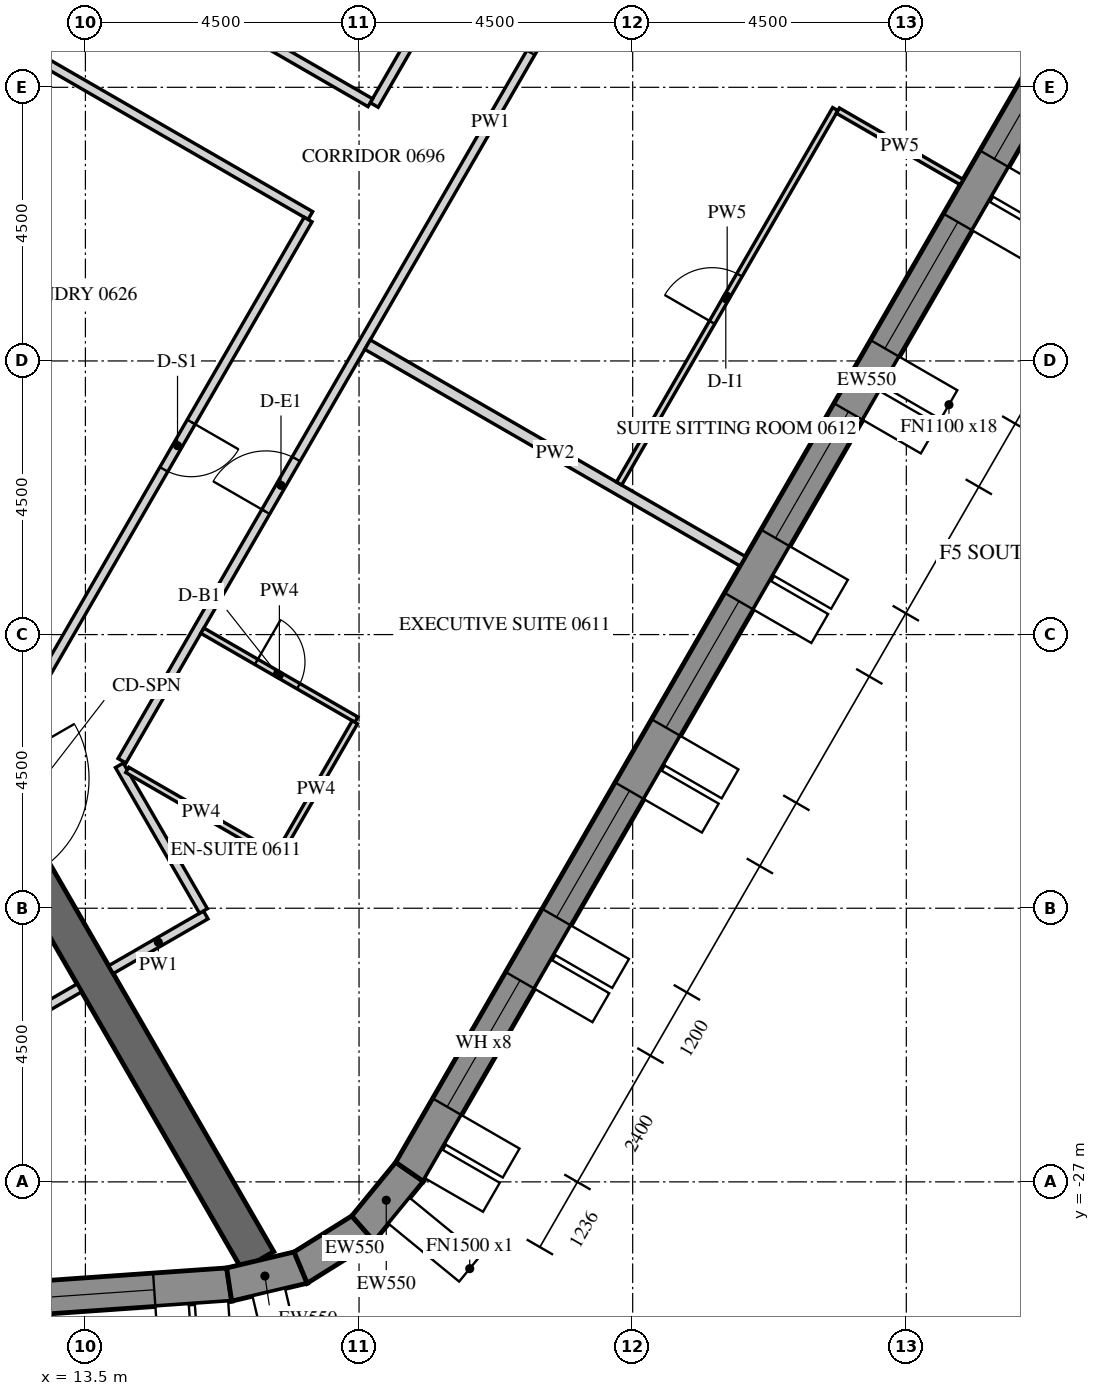
"""IFC4 building model, lengths in metres.
Left out: names, types, materials, properties, quantities, classifications, styles, units other than length and angle.
Written with IfcOpenShell. Run it as: python <this file> out.ifc"""

import sys

from ifc_helpers import new_model, si_unit, direction, frame, frame_2d, origin, place, context, subcontext, project, spatial, polyline, rectangle, outline, extrude, element, fill, save


model = new_model("IFC4")
c1 = context("Model", 3, precision=1e-05, world=origin(), true_north=direction((0.0, 1.0)))
c2 = subcontext(c1, "Body", "Model", "MODEL_VIEW")
j1 = project(units=[si_unit("LENGTHUNIT", "METRE"), si_unit("PLANEANGLEUNIT", "RADIAN")], contexts=[c1])
p1 = place(None, origin())
s1 = spatial("IfcSite", under=j1, at=p1, CompositionType="ELEMENT")
p2 = place(p1, origin())
s2 = spatial("IfcBuilding", under=s1, at=p2, CompositionType="ELEMENT")
p3 = place(p2, frame((0.0, 0.0, 92.1)))
s3 = spatial("IfcBuildingStorey", under=s2, at=p3, CompositionType="ELEMENT", Elevation=92.1)
p4 = place(p3, frame((-14.134, -30.786, -0.15), z_axis=(0.0, 0.0, 1.0), x_axis=(0.997564037441, 0.069756657061, 0.0)))
e1 = element("IfcWall", 1, at=p4, inside=s3, PredefinedType="SOLIDWALL", context=c2, shape_type="SweptSolid", body=[
    extrude(outline(polyline([(-0.026, -0.275), (30.094, -0.275), (30.049, 0.275), (0.026, 0.275), (-0.026, -0.275)])), origin(), (0.0, 0.0, 1.0), 3.9),
])
p5 = place(p4, frame((1.236, 0.0, 1.05)))
e2 = element("IfcOpeningElement", 2, at=p5, cuts=e1, PredefinedType="OPENING", context=c2, shape_type="SweptSolid", body=[
    extrude(rectangle(XDim=2.4, YDim=2.4, at=frame_2d((1.2, 1.2))), frame((0.0, 0.285, 0.0), z_axis=(0.0, -1.0, 0.0), x_axis=(1.0, 0.0, 0.0)), (0.0, 0.0, 1.0), 0.57),
])
p6 = place(p4, frame((4.835, 0.0, 1.05)))
e3 = element("IfcOpeningElement", 3, at=p6, cuts=e1, PredefinedType="OPENING", context=c2, shape_type="SweptSolid", body=[
    extrude(rectangle(XDim=2.4, YDim=2.4, at=frame_2d((1.2, 1.2))), frame((0.0, 0.285, 0.0), z_axis=(0.0, -1.0, 0.0), x_axis=(1.0, 0.0, 0.0)), (0.0, 0.0, 1.0), 0.57),
])
p7 = place(p4, frame((8.436, 0.0, 1.05)))
e4 = element("IfcOpeningElement", 4, at=p7, cuts=e1, PredefinedType="OPENING", context=c2, shape_type="SweptSolid", body=[
    extrude(rectangle(XDim=2.4, YDim=2.4, at=frame_2d((1.2, 1.2))), frame((0.0, 0.285, 0.0), z_axis=(0.0, -1.0, 0.0), x_axis=(1.0, 0.0, 0.0)), (0.0, 0.0, 1.0), 0.57),
])
p8 = place(p4, frame((12.035, 0.0, 1.05)))
e5 = element("IfcOpeningElement", 5, at=p8, cuts=e1, PredefinedType="OPENING", context=c2, shape_type="SweptSolid", body=[
    extrude(rectangle(XDim=2.4, YDim=2.4, at=frame_2d((1.2, 1.2))), frame((0.0, 0.285, 0.0), z_axis=(0.0, -1.0, 0.0), x_axis=(1.0, 0.0, 0.0)), (0.0, 0.0, 1.0), 0.57),
])
p9 = place(p4, frame((15.635, 0.0, 1.05)))
e6 = element("IfcOpeningElement", 6, at=p9, cuts=e1, PredefinedType="OPENING", context=c2, shape_type="SweptSolid", body=[
    extrude(rectangle(XDim=2.4, YDim=2.4, at=frame_2d((1.2, 1.2))), frame((0.0, 0.285, 0.0), z_axis=(0.0, -1.0, 0.0), x_axis=(1.0, 0.0, 0.0)), (0.0, 0.0, 1.0), 0.57),
])
p10 = place(p4, frame((19.236, 0.0, 1.05)))
e7 = element("IfcOpeningElement", 7, at=p10, cuts=e1, PredefinedType="OPENING", context=c2, shape_type="SweptSolid", body=[
    extrude(rectangle(XDim=2.4, YDim=2.4, at=frame_2d((1.2, 1.2))), frame((0.0, 0.285, 0.0), z_axis=(0.0, -1.0, 0.0), x_axis=(1.0, 0.0, 0.0)), (0.0, 0.0, 1.0), 0.57),
])
p11 = place(p4, frame((22.835, 0.0, 1.05)))
e8 = element("IfcOpeningElement", 8, at=p11, cuts=e1, PredefinedType="OPENING", context=c2, shape_type="SweptSolid", body=[
    extrude(rectangle(XDim=2.4, YDim=2.4, at=frame_2d((1.2, 1.2))), frame((0.0, 0.285, 0.0), z_axis=(0.0, -1.0, 0.0), x_axis=(1.0, 0.0, 0.0)), (0.0, 0.0, 1.0), 0.57),
])
p12 = place(p4, frame((26.436, 0.0, 1.05)))
e9 = element("IfcOpeningElement", 9, at=p12, cuts=e1, PredefinedType="OPENING", context=c2, shape_type="SweptSolid", body=[
    extrude(rectangle(XDim=2.4, YDim=2.4, at=frame_2d((1.2, 1.2))), frame((0.0, 0.285, 0.0), z_axis=(0.0, -1.0, 0.0), x_axis=(1.0, 0.0, 0.0)), (0.0, 0.0, 1.0), 0.57),
])
p13 = place(p3, frame((15.864, -28.688, -0.15), z_axis=(0.0, 0.0, 1.0), x_axis=(0.973063591128, 0.230536868247, 0.0)))
e10 = element("IfcWall", 10, at=p13, inside=s3, PredefinedType="SOLIDWALL", context=c2, shape_type="SweptSolid", body=[
    extrude(outline(polyline([(-0.022, -0.275), (1.253, -0.275), (1.163, 0.275), (0.022, 0.275), (-0.022, -0.275)])), origin(), (0.0, 0.0, 1.0), 3.9),
])
p14 = place(p3, frame((17.04, -28.41, -0.15), z_axis=(0.0, 0.0, 1.0), x_axis=(0.847952888306, 0.530071598195, 0.0)))
e11 = element("IfcWall", 11, at=p14, inside=s3, PredefinedType="SOLIDWALL", context=c2, shape_type="SweptSolid", body=[
    extrude(outline(polyline([(-0.045, -0.275), (1.253, -0.275), (1.163, 0.275), (0.045, 0.275), (-0.045, -0.275)])), origin(), (0.0, 0.0, 1.0), 3.9),
])
p15 = place(p3, frame((18.064, -27.769, -0.15), z_axis=(0.0, 0.0, 1.0), x_axis=(0.633842757806, 0.773461930787, 0.0)))
e12 = element("IfcWall", 12, at=p15, inside=s3, PredefinedType="SOLIDWALL", context=c2, shape_type="SweptSolid", body=[
    extrude(outline(polyline([(-0.045, -0.275), (1.231, -0.275), (1.186, 0.275), (0.045, 0.275), (-0.045, -0.275)])), origin(), (0.0, 0.0, 1.0), 3.9),
])
p16 = place(p3, frame((18.83, -26.835, -0.15), z_axis=(0.0, 0.0, 1.0), x_axis=(0.500003800416, 0.866023209602, 0.0)))
e13 = element("IfcWall", 13, at=p16, inside=s3, PredefinedType="SOLIDWALL", context=c2, shape_type="SweptSolid", body=[
    extrude(outline(polyline([(-0.022, -0.275), (30.097, -0.275), (30.045, 0.275), (0.022, 0.275), (-0.022, -0.275)])), origin(), (0.0, 0.0, 1.0), 3.9),
])
p17 = place(p16, frame((1.236, 0.0, 1.05)))
e14 = element("IfcOpeningElement", 14, at=p17, cuts=e13, PredefinedType="OPENING", context=c2, shape_type="SweptSolid", body=[
    extrude(rectangle(XDim=2.4, YDim=2.4, at=frame_2d((1.2, 1.2))), frame((0.0, 0.285, 0.0), z_axis=(0.0, -1.0, 0.0), x_axis=(1.0, 0.0, 0.0)), (0.0, 0.0, 1.0), 0.57),
])
p18 = place(p16, frame((4.835, 0.0, 1.05)))
e15 = element("IfcOpeningElement", 15, at=p18, cuts=e13, PredefinedType="OPENING", context=c2, shape_type="SweptSolid", body=[
    extrude(rectangle(XDim=2.4, YDim=2.4, at=frame_2d((1.2, 1.2))), frame((0.0, 0.285, 0.0), z_axis=(0.0, -1.0, 0.0), x_axis=(1.0, 0.0, 0.0)), (0.0, 0.0, 1.0), 0.57),
])
p19 = place(p16, frame((8.436, 0.0, 1.05)))
e16 = element("IfcOpeningElement", 16, at=p19, cuts=e13, PredefinedType="OPENING", context=c2, shape_type="SweptSolid", body=[
    extrude(rectangle(XDim=2.4, YDim=2.4, at=frame_2d((1.2, 1.2))), frame((0.0, 0.285, 0.0), z_axis=(0.0, -1.0, 0.0), x_axis=(1.0, 0.0, 0.0)), (0.0, 0.0, 1.0), 0.57),
])
p20 = place(p16, frame((12.035, 0.0, 1.05)))
e17 = element("IfcOpeningElement", 17, at=p20, cuts=e13, PredefinedType="OPENING", context=c2, shape_type="SweptSolid", body=[
    extrude(rectangle(XDim=2.4, YDim=2.4, at=frame_2d((1.2, 1.2))), frame((0.0, 0.285, 0.0), z_axis=(0.0, -1.0, 0.0), x_axis=(1.0, 0.0, 0.0)), (0.0, 0.0, 1.0), 0.57),
])
p21 = place(p16, frame((15.635, 0.0, 1.05)))
e18 = element("IfcOpeningElement", 18, at=p21, cuts=e13, PredefinedType="OPENING", context=c2, shape_type="SweptSolid", body=[
    extrude(rectangle(XDim=2.4, YDim=2.4, at=frame_2d((1.2, 1.2))), frame((0.0, 0.285, 0.0), z_axis=(0.0, -1.0, 0.0), x_axis=(1.0, 0.0, 0.0)), (0.0, 0.0, 1.0), 0.57),
])
p22 = place(p16, frame((19.236, 0.0, 1.05)))
e19 = element("IfcOpeningElement", 19, at=p22, cuts=e13, PredefinedType="OPENING", context=c2, shape_type="SweptSolid", body=[
    extrude(rectangle(XDim=2.4, YDim=2.4, at=frame_2d((1.2, 1.2))), frame((0.0, 0.285, 0.0), z_axis=(0.0, -1.0, 0.0), x_axis=(1.0, 0.0, 0.0)), (0.0, 0.0, 1.0), 0.57),
])
p23 = place(p16, frame((22.835, 0.0, 1.05)))
e20 = element("IfcOpeningElement", 20, at=p23, cuts=e13, PredefinedType="OPENING", context=c2, shape_type="SweptSolid", body=[
    extrude(rectangle(XDim=2.4, YDim=2.4, at=frame_2d((1.2, 1.2))), frame((0.0, 0.285, 0.0), z_axis=(0.0, -1.0, 0.0), x_axis=(1.0, 0.0, 0.0)), (0.0, 0.0, 1.0), 0.57),
])
p24 = place(p16, frame((26.436, 0.0, 1.05)))
e21 = element("IfcOpeningElement", 21, at=p24, cuts=e13, PredefinedType="OPENING", context=c2, shape_type="SweptSolid", body=[
    extrude(rectangle(XDim=2.4, YDim=2.4, at=frame_2d((1.2, 1.2))), frame((0.0, 0.285, 0.0), z_axis=(0.0, -1.0, 0.0), x_axis=(1.0, 0.0, 0.0)), (0.0, 0.0, 1.0), 0.57),
])
p25 = place(p3, frame((7.91, -13.7, -0.15), z_axis=(0.0, 0.0, 1.0), x_axis=(0.499999880136, 0.866025472988, 0.0)))
e22 = element("IfcWall", 22, at=p25, inside=s3, PredefinedType="SHEAR", context=c2, shape_type="SweptSolid", body=[
    extrude(outline(polyline([(-0.173, -0.3), (15.993, -0.3), (15.646, 0.3), (0.173, 0.3), (-0.173, -0.3)])), origin(), (0.0, 0.0, 1.0), 3.9),
])
p26 = place(p25, frame((7.039, 0.0, 0.15)))
e23 = element("IfcOpeningElement", 23, at=p26, cuts=e22, PredefinedType="OPENING", context=c2, shape_type="SweptSolid", body=[
    extrude(rectangle(XDim=1.8, YDim=2.4, at=frame_2d((0.9, 1.2))), frame((0.0, 0.31, 0.0), z_axis=(0.0, -1.0, 0.0), x_axis=(1.0, 0.0, 0.0)), (0.0, 0.0, 1.0), 0.62),
])
p27 = place(p3, frame((8.083, -14.0, -0.15), z_axis=(0.0, 0.0, 1.0), x_axis=(0.499997680643, -0.866026742862, 0.0)))
e24 = element("IfcWall", 24, at=p27, inside=s3, PredefinedType="SHEAR", context=c2, shape_type="SweptSolid", body=[
    extrude(rectangle(XDim=16.509, YDim=0.6, at=frame_2d((8.254, 0.0))), origin(), (0.0, 0.0, 1.0), 3.9),
])
p28 = place(p27, frame((7.354, 0.0, 0.15)))
e25 = element("IfcOpeningElement", 25, at=p28, cuts=e24, PredefinedType="OPENING", context=c2, shape_type="SweptSolid", body=[
    extrude(rectangle(XDim=1.8, YDim=2.4, at=frame_2d((0.9, 1.2))), frame((0.0, 0.31, 0.0), z_axis=(0.0, -1.0, 0.0), x_axis=(1.0, 0.0, 0.0)), (0.0, 0.0, 1.0), 0.62),
])
p29 = place(p3, frame((11.906, -24.673, 0.0), z_axis=(0.0, 0.0, 1.0), x_axis=(0.866013532718, 0.500020560727, 0.0)))
e26 = element("IfcWall", 26, at=p29, inside=s3, PredefinedType="PARTITIONING", context=c2, shape_type="SweptSolid", body=[
    extrude(rectangle(XDim=1.725, YDim=0.15, at=frame_2d((0.863, 0.0))), origin(), (0.0, 0.0, 1.0), 2.988),
])
p30 = place(p3, frame((13.92, -23.51, 0.0), z_axis=(0.0, 0.0, 1.0), x_axis=(0.866047807691, 0.499961193289, 0.0)))
e27 = element("IfcWall", 27, at=p30, inside=s3, PredefinedType="PARTITIONING", context=c2, shape_type="SweptSolid", body=[
    extrude(rectangle(XDim=1.8, YDim=0.15, at=frame_2d((0.9, 0.0))), origin(), (0.0, 0.0, 1.0), 2.988),
])
p31 = place(p3, frame((15.441, -22.545, 0.0), z_axis=(0.0, 0.0, 1.0), x_axis=(-0.499974611044, 0.866040061609, 0.0)))
e28 = element("IfcWall", 28, at=p31, inside=s3, PredefinedType="PARTITIONING", context=c2, shape_type="SweptSolid", body=[
    extrude(rectangle(XDim=2.766, YDim=0.15, at=frame_2d((1.383, 0.0))), origin(), (0.0, 0.0, 1.0), 2.988),
])
p32 = place(p3, frame((14.102, -20.075, 0.0), z_axis=(0.0, 0.0, 1.0), x_axis=(0.499996816197, 0.866027241946, 0.0)))
e29 = element("IfcWall", 29, at=p32, inside=s3, PredefinedType="PARTITIONING", context=c2, shape_type="SweptSolid", body=[
    extrude(rectangle(XDim=24.238, YDim=0.15, at=frame_2d((12.119, 0.0))), origin(), (0.0, 0.0, 1.0), 2.988),
])
p33 = place(p32, frame((4.729, 0.0, 0.0)))
e30 = element("IfcOpeningElement", 30, at=p33, cuts=e29, PredefinedType="OPENING", context=c2, shape_type="SweptSolid", body=[
    extrude(rectangle(XDim=1.0, YDim=2.1, at=frame_2d((0.5, 1.05))), frame((0.0, 0.085, 0.0), z_axis=(0.0, -1.0, 0.0), x_axis=(1.0, 0.0, 0.0)), (0.0, 0.0, 1.0), 0.17),
])
p34 = place(p32, frame((13.446, 0.0, 0.0)))
e31 = element("IfcOpeningElement", 31, at=p34, cuts=e29, PredefinedType="OPENING", context=c2, shape_type="SweptSolid", body=[
    extrude(rectangle(XDim=1.0, YDim=2.1, at=frame_2d((0.5, 1.05))), frame((0.0, 0.085, 0.0), z_axis=(0.0, -1.0, 0.0), x_axis=(1.0, 0.0, 0.0)), (0.0, 0.0, 1.0), 0.17),
])
p35 = place(p3, frame((24.058, 0.769, 0.0), z_axis=(0.0, 0.0, 1.0), x_axis=(-0.499995346943, -0.866028090212, 0.0)))
e32 = element("IfcWall", 32, at=p35, inside=s3, PredefinedType="PARTITIONING", context=c2, shape_type="SweptSolid", body=[
    extrude(rectangle(XDim=11.616, YDim=0.15, at=frame_2d((5.808, 0.0))), origin(), (0.0, 0.0, 1.0), 2.988),
])
p36 = place(p35, frame((5.358, 0.0, 0.0)))
e33 = element("IfcOpeningElement", 33, at=p36, cuts=e32, PredefinedType="OPENING", context=c2, shape_type="SweptSolid", body=[
    extrude(rectangle(XDim=0.9, YDim=2.1, at=frame_2d((0.45, 1.05))), frame((0.0, 0.085, 0.0), z_axis=(0.0, -1.0, 0.0), x_axis=(1.0, 0.0, 0.0)), (0.0, 0.0, 1.0), 0.17),
])
p37 = place(p3, frame((18.185, -9.253, 0.0), z_axis=(0.0, 0.0, 1.0), x_axis=(-0.866028703517, 0.499994284652, 0.0)))
e34 = element("IfcWall", 34, at=p37, inside=s3, PredefinedType="PARTITIONING", context=c2, shape_type="SweptSolid", body=[
    extrude(rectangle(XDim=6.375, YDim=0.15, at=frame_2d((3.188, 0.0))), origin(), (0.0, 0.0, 1.0), 2.988),
])
p38 = place(p3, frame((11.614, -7.884, 0.0), z_axis=(0.0, 0.0, 1.0), x_axis=(0.866021702275, -0.500006411147, 0.0)))
e35 = element("IfcWall", 35, at=p38, inside=s3, PredefinedType="PARTITIONING", context=c2, shape_type="SweptSolid", body=[
    extrude(rectangle(XDim=6.45, YDim=0.15, at=frame_2d((3.225, 0.0))), origin(), (0.0, 0.0, 1.0), 2.988),
])
p39 = place(p3, frame((17.162, -11.174, 0.0), z_axis=(0.0, 0.0, 1.0), x_axis=(-0.499997214665, -0.866027011893, 0.0)))
e36 = element("IfcWall", 36, at=p39, inside=s3, PredefinedType="PARTITIONING", context=c2, shape_type="SweptSolid", body=[
    extrude(rectangle(XDim=8.589, YDim=0.15, at=frame_2d((4.294, 0.0))), origin(), (0.0, 0.0, 1.0), 2.988),
])
p40 = place(p39, frame((3.844, 0.0, 0.0)))
e37 = element("IfcOpeningElement", 37, at=p40, cuts=e36, PredefinedType="OPENING", context=c2, shape_type="SweptSolid", body=[
    extrude(rectangle(XDim=0.9, YDim=2.1, at=frame_2d((0.45, 1.05))), frame((0.0, 0.085, 0.0), z_axis=(0.0, -1.0, 0.0), x_axis=(1.0, 0.0, 0.0)), (0.0, 0.0, 1.0), 0.17),
])
p41 = place(p3, frame((15.423, -17.936, 0.0), z_axis=(0.0, 0.0, 1.0), x_axis=(0.86601045545, -0.500025890382, 0.0)))
e38 = element("IfcWall", 38, at=p41, inside=s3, PredefinedType="PARTITIONING", context=c2, shape_type="SweptSolid", body=[
    extrude(rectangle(XDim=2.925, YDim=0.1, at=frame_2d((1.462, 0.0))), origin(), (0.0, 0.0, 1.0), 2.988),
])
p42 = place(p41, frame((1.025, 0.0, 0.0)))
e39 = element("IfcOpeningElement", 39, at=p42, cuts=e38, PredefinedType="OPENING", context=c2, shape_type="SweptSolid", body=[
    extrude(rectangle(XDim=0.8, YDim=2.1, at=frame_2d((0.4, 1.05))), frame((0.0, 0.06, 0.0), z_axis=(0.0, -1.0, 0.0), x_axis=(1.0, 0.0, 0.0)), (0.0, 0.0, 1.0), 0.12),
])
p43 = place(p3, frame((17.932, -19.442, 0.0), z_axis=(0.0, 0.0, 1.0), x_axis=(-0.500062241894, -0.865989465428, 0.0)))
e40 = element("IfcWall", 40, at=p43, inside=s3, PredefinedType="PARTITIONING", context=c2, shape_type="SweptSolid", body=[
    extrude(rectangle(XDim=2.55, YDim=0.1, at=frame_2d((1.275, 0.0))), origin(), (0.0, 0.0, 1.0), 2.988),
])
p44 = place(p3, frame((16.613, -21.625, 0.0), z_axis=(0.0, 0.0, 1.0), x_axis=(-0.866034573852, 0.49998411664, 0.0)))
e41 = element("IfcWall", 41, at=p44, inside=s3, PredefinedType="PARTITIONING", context=c2, shape_type="SweptSolid", body=[
    extrude(rectangle(XDim=2.8, YDim=0.1, at=frame_2d((1.4, 0.0))), origin(), (0.0, 0.0, 1.0), 2.988),
])
p45 = place(p3, frame((24.31, -16.794, 0.0), z_axis=(0.0, 0.0, 1.0), x_axis=(-0.866024672353, 0.500001266874, 0.0)))
e42 = element("IfcWall", 42, at=p45, inside=s3, PredefinedType="PARTITIONING", context=c2, shape_type="SweptSolid", body=[
    extrude(rectangle(XDim=7.125, YDim=0.18, at=frame_2d((3.562, 0.0))), origin(), (0.0, 0.0, 1.0), 2.988),
])
p46 = place(p3, frame((22.277, -15.516, 0.0), z_axis=(0.0, 0.0, 1.0), x_axis=(0.499990956993, 0.866030624704, 0.0)))
e43 = element("IfcWall", 43, at=p46, inside=s3, PredefinedType="PARTITIONING", context=c2, shape_type="SweptSolid", body=[
    extrude(rectangle(XDim=7.11, YDim=0.1, at=frame_2d((3.555, 0.0))), origin(), (0.0, 0.0, 1.0), 2.988),
])
p47 = place(p46, frame((3.06, 0.0, 0.0)))
e44 = element("IfcOpeningElement", 44, at=p47, cuts=e43, PredefinedType="OPENING", context=c2, shape_type="SweptSolid", body=[
    extrude(rectangle(XDim=0.9, YDim=2.1, at=frame_2d((0.45, 1.05))), frame((0.0, 0.06, 0.0), z_axis=(0.0, -1.0, 0.0), x_axis=(1.0, 0.0, 0.0)), (0.0, 0.0, 1.0), 0.12),
])
p48 = place(p3, frame((25.875, -9.384, 0.0), z_axis=(0.0, 0.0, 1.0), x_axis=(0.866016039709, -0.500016218704, 0.0)))
e45 = element("IfcWall", 45, at=p48, inside=s3, PredefinedType="PARTITIONING", context=c2, shape_type="SweptSolid", body=[
    extrude(rectangle(XDim=2.35, YDim=0.1, at=frame_2d((1.175, 0.0))), origin(), (0.0, 0.0, 1.0), 2.988),
])
p49 = place(p12, frame((0.0, 0.205, 0.0)))
e46 = element("IfcWindow", 46, at=p49, inside=s3, PartitioningType="DOUBLE_PANEL_VERTICAL", PredefinedType="WINDOW", context=c2, shape_type="SweptSolid", body=[
    extrude(rectangle(XDim=2.4, YDim=2.4, at=frame_2d((1.2, 1.2))), frame((0.0, 0.03, 0.0), z_axis=(0.0, -1.0, 0.0), x_axis=(1.0, 0.0, 0.0)), (0.0, 0.0, 1.0), 0.06),
])
fill(e9, e46)
p50 = place(p17, frame((0.0, 0.205, 0.0)))
e47 = element("IfcWindow", 47, at=p50, inside=s3, PartitioningType="DOUBLE_PANEL_VERTICAL", PredefinedType="WINDOW", context=c2, shape_type="SweptSolid", body=[
    extrude(rectangle(XDim=2.4, YDim=2.4, at=frame_2d((1.2, 1.2))), frame((0.0, 0.03, 0.0), z_axis=(0.0, -1.0, 0.0), x_axis=(1.0, 0.0, 0.0)), (0.0, 0.0, 1.0), 0.06),
])
fill(e14, e47)
p51 = place(p18, frame((0.0, 0.205, 0.0)))
e48 = element("IfcWindow", 48, at=p51, inside=s3, PartitioningType="DOUBLE_PANEL_VERTICAL", PredefinedType="WINDOW", context=c2, shape_type="SweptSolid", body=[
    extrude(rectangle(XDim=2.4, YDim=2.4, at=frame_2d((1.2, 1.2))), frame((0.0, 0.03, 0.0), z_axis=(0.0, -1.0, 0.0), x_axis=(1.0, 0.0, 0.0)), (0.0, 0.0, 1.0), 0.06),
])
fill(e15, e48)
p52 = place(p19, frame((0.0, 0.205, 0.0)))
e49 = element("IfcWindow", 49, at=p52, inside=s3, PartitioningType="DOUBLE_PANEL_VERTICAL", PredefinedType="WINDOW", context=c2, shape_type="SweptSolid", body=[
    extrude(rectangle(XDim=2.4, YDim=2.4, at=frame_2d((1.2, 1.2))), frame((0.0, 0.03, 0.0), z_axis=(0.0, -1.0, 0.0), x_axis=(1.0, 0.0, 0.0)), (0.0, 0.0, 1.0), 0.06),
])
fill(e16, e49)
p53 = place(p20, frame((0.0, 0.205, 0.0)))
e50 = element("IfcWindow", 50, at=p53, inside=s3, PartitioningType="DOUBLE_PANEL_VERTICAL", PredefinedType="WINDOW", context=c2, shape_type="SweptSolid", body=[
    extrude(rectangle(XDim=2.4, YDim=2.4, at=frame_2d((1.2, 1.2))), frame((0.0, 0.03, 0.0), z_axis=(0.0, -1.0, 0.0), x_axis=(1.0, 0.0, 0.0)), (0.0, 0.0, 1.0), 0.06),
])
fill(e17, e50)
p54 = place(p21, frame((0.0, 0.205, 0.0)))
e51 = element("IfcWindow", 51, at=p54, inside=s3, PartitioningType="DOUBLE_PANEL_VERTICAL", PredefinedType="WINDOW", context=c2, shape_type="SweptSolid", body=[
    extrude(rectangle(XDim=2.4, YDim=2.4, at=frame_2d((1.2, 1.2))), frame((0.0, 0.03, 0.0), z_axis=(0.0, -1.0, 0.0), x_axis=(1.0, 0.0, 0.0)), (0.0, 0.0, 1.0), 0.06),
])
fill(e18, e51)
p55 = place(p22, frame((0.0, 0.205, 0.0)))
e52 = element("IfcWindow", 52, at=p55, inside=s3, PartitioningType="DOUBLE_PANEL_VERTICAL", PredefinedType="WINDOW", context=c2, shape_type="SweptSolid", body=[
    extrude(rectangle(XDim=2.4, YDim=2.4, at=frame_2d((1.2, 1.2))), frame((0.0, 0.03, 0.0), z_axis=(0.0, -1.0, 0.0), x_axis=(1.0, 0.0, 0.0)), (0.0, 0.0, 1.0), 0.06),
])
fill(e19, e52)
p56 = place(p33, origin())
e53 = element("IfcDoor", 53, at=p56, inside=s3, OperationType="SINGLE_SWING_LEFT", PredefinedType="DOOR", context=c2, shape_type="SweptSolid", body=[
    extrude(rectangle(XDim=1.0, YDim=2.1, at=frame_2d((0.5, 1.05))), frame((0.0, 0.025, 0.0), z_axis=(0.0, -1.0, 0.0), x_axis=(1.0, 0.0, 0.0)), (0.0, 0.0, 1.0), 0.05),
])
fill(e30, e53)
p57 = place(p42, origin())
e54 = element("IfcDoor", 54, at=p57, inside=s3, OperationType="SINGLE_SWING_RIGHT", PredefinedType="DOOR", context=c2, shape_type="SweptSolid", body=[
    extrude(rectangle(XDim=0.8, YDim=2.1, at=frame_2d((0.4, 1.05))), frame((0.0, 0.025, 0.0), z_axis=(0.0, -1.0, 0.0), x_axis=(1.0, 0.0, 0.0)), (0.0, 0.0, 1.0), 0.05),
])
fill(e39, e54)
p58 = place(p34, origin())
e55 = element("IfcDoor", 55, at=p58, inside=s3, OperationType="SINGLE_SWING_RIGHT", PredefinedType="DOOR", context=c2, shape_type="SweptSolid", body=[
    extrude(rectangle(XDim=1.0, YDim=2.1, at=frame_2d((0.5, 1.05))), frame((0.0, 0.025, 0.0), z_axis=(0.0, -1.0, 0.0), x_axis=(1.0, 0.0, 0.0)), (0.0, 0.0, 1.0), 0.05),
])
fill(e31, e55)
p59 = place(p47, origin())
e56 = element("IfcDoor", 56, at=p59, inside=s3, OperationType="SINGLE_SWING_RIGHT", PredefinedType="DOOR", context=c2, shape_type="SweptSolid", body=[
    extrude(rectangle(XDim=0.9, YDim=2.1, at=frame_2d((0.45, 1.05))), frame((0.0, 0.025, 0.0), z_axis=(0.0, -1.0, 0.0), x_axis=(1.0, 0.0, 0.0)), (0.0, 0.0, 1.0), 0.05),
])
fill(e44, e56)
p60 = place(p40, origin())
e57 = element("IfcDoor", 57, at=p60, inside=s3, OperationType="SINGLE_SWING_LEFT", PredefinedType="DOOR", context=c2, shape_type="SweptSolid", body=[
    extrude(rectangle(XDim=0.9, YDim=2.1, at=frame_2d((0.45, 1.05))), frame((0.0, 0.025, 0.0), z_axis=(0.0, -1.0, 0.0), x_axis=(1.0, 0.0, 0.0)), (0.0, 0.0, 1.0), 0.05),
])
fill(e37, e57)
save(model, sys.argv[1])
